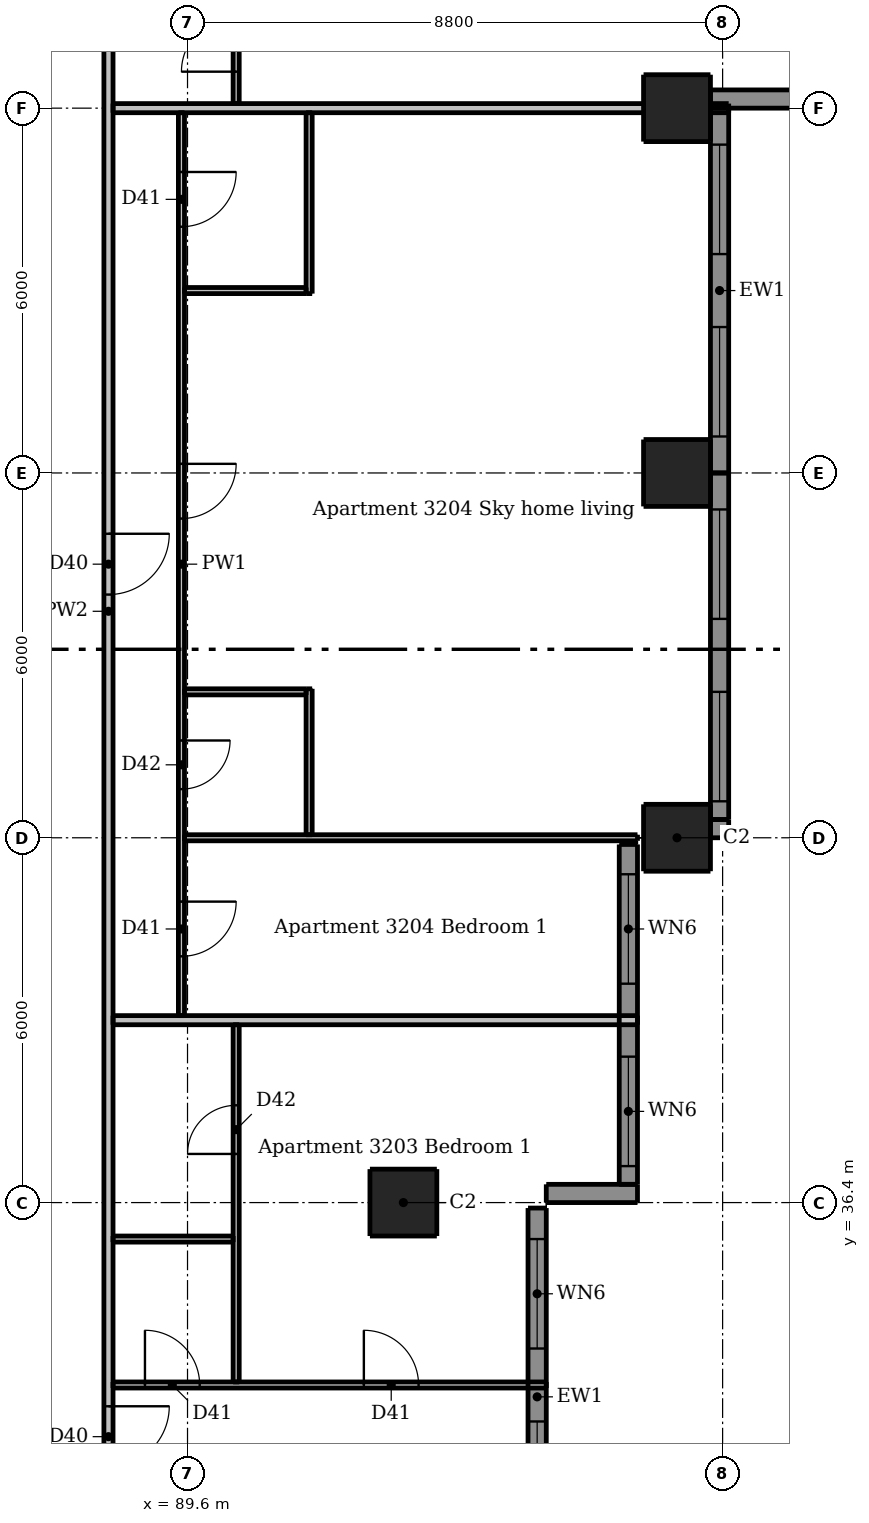
"""IFC4 building model, lengths in metres.
Left out: names, types, materials, properties, quantities, classifications, styles, units other than length and angle.
Written with IfcOpenShell. Run it as: python <this file> out.ifc"""

import sys

from ifc_helpers import new_model, si_unit, direction, frame, frame_2d, origin, origin_2d, place, context, subcontext, project, spatial, rectangle, extrude, element, fill, save


model = new_model("IFC4")
c1 = context("Model", 3, precision=1e-05, world=origin(), true_north=direction((0.0, 1.0)))
c2 = subcontext(c1, "Body", "Model", "MODEL_VIEW")
j1 = project(units=[si_unit("LENGTHUNIT", "METRE"), si_unit("PLANEANGLEUNIT", "RADIAN")], contexts=[c1])
p1 = place(None, origin())
s1 = spatial("IfcSite", under=j1, at=p1, CompositionType="ELEMENT")
p2 = place(p1, origin())
s2 = spatial("IfcBuilding", under=s1, at=p2, CompositionType="ELEMENT")
p3 = place(p2, frame((0.0, 0.0, 118.3)))
s3 = spatial("IfcBuildingStorey", under=s2, at=p3, CompositionType="ELEMENT", Elevation=118.3)
for number, where, z_axis, x_axis in (
    (1, (93.15, 36.4, 0.0), (0.0, 0.0, 1.0), (1.0, 0.0, 0.0)),
    (2, (97.65, 42.4, 0.0), (0.0, 0.0, 1.0), (1.0, 0.0, 0.0)),
    (3, (97.65, 48.4, 0.0), (0.0, 0.0, 1.0), (1.0, 0.0, 0.0)),
    (4, (97.65, 54.4, 0.0), (0.0, 0.0, 1.0), (1.0, 0.0, 0.0)),
):
    element("IfcColumn", number, at=place(p3, frame(where, z_axis=z_axis, x_axis=x_axis)), inside=s3, PredefinedType="COLUMN", context=c2, shape_type="SweptSolid", body=[
        extrude(rectangle(XDim=1.1, YDim=1.1, at=origin_2d()), origin(), (0.0, 0.0, 1.0), 3.05),
    ])
p4 = place(p3, frame((95.5, 36.55, 0.0), z_axis=(0.0, 0.0, 1.0), x_axis=(1.0, 0.0, 0.0)))
e5 = element("IfcWall", 5, at=p4, inside=s3, PredefinedType="SOLIDWALL", context=c2, shape_type="SweptSolid", body=[
    extrude(rectangle(XDim=1.5, YDim=0.3, at=frame_2d((0.75, 0.0))), origin(), (0.0, 0.0, 1.0), 3.05),
])
p5 = place(p3, frame((98.2, 42.55, 0.0), z_axis=(0.0, 0.0, 1.0), x_axis=(1.0, 0.0, 0.0)))
e6 = element("IfcWall", 6, at=p5, inside=s3, PredefinedType="SOLIDWALL", context=c2, shape_type="SweptSolid", body=[
    extrude(rectangle(XDim=0.3, YDim=0.3, at=frame_2d((0.15, 0.0))), origin(), (0.0, 0.0, 1.0), 3.05),
])
p6 = place(p3, frame((98.2, 54.55, 0.0), z_axis=(0.0, 0.0, 1.0), x_axis=(1.0, 0.0, 0.0)))
e7 = element("IfcWall", 7, at=p6, inside=s3, PredefinedType="SOLIDWALL", context=c2, shape_type="SweptSolid", body=[
    extrude(rectangle(XDim=1.8, YDim=0.3, at=frame_2d((0.9, 0.0))), origin(), (0.0, 0.0, 1.0), 3.05),
])
p7 = place(p3, frame((95.35, 30.1, 0.0), z_axis=(0.0, 0.0, 1.0), x_axis=(0.0, 1.0, 0.0)))
e8 = element("IfcWall", 8, at=p7, inside=s3, PredefinedType="SOLIDWALL", context=c2, shape_type="SweptSolid", body=[
    extrude(rectangle(XDim=6.21, YDim=0.3, at=frame_2d((3.105, 0.0))), origin(), (0.0, 0.0, 1.0), 3.05),
])
p8 = place(p7, frame((0.9, 0.0, 0.15)))
e9 = element("IfcOpeningElement", 9, at=p8, cuts=e8, PredefinedType="OPENING", context=c2, shape_type="SweptSolid", body=[
    extrude(rectangle(XDim=1.8, YDim=2.1, at=frame_2d((0.9, 1.05))), frame((0.0, 0.16, 0.0), z_axis=(0.0, -1.0, 0.0), x_axis=(1.0, 0.0, 0.0)), (0.0, 0.0, 1.0), 0.32),
])
p9 = place(p7, frame((3.9, 0.0, 0.15)))
e10 = element("IfcOpeningElement", 10, at=p9, cuts=e8, PredefinedType="OPENING", context=c2, shape_type="SweptSolid", body=[
    extrude(rectangle(XDim=1.8, YDim=2.1, at=frame_2d((0.9, 1.05))), frame((0.0, 0.16, 0.0), z_axis=(0.0, -1.0, 0.0), x_axis=(1.0, 0.0, 0.0)), (0.0, 0.0, 1.0), 0.32),
])
p10 = place(p3, frame((96.85, 36.7, 0.0), z_axis=(0.0, 0.0, 1.0), x_axis=(0.0, 1.0, 0.0)))
e11 = element("IfcWall", 11, at=p10, inside=s3, PredefinedType="SOLIDWALL", context=c2, shape_type="SweptSolid", body=[
    extrude(rectangle(XDim=5.59, YDim=0.3, at=frame_2d((2.795, 0.0))), origin(), (0.0, 0.0, 1.0), 3.05),
])
p11 = place(p10, frame((0.3, 0.0, 0.15)))
e12 = element("IfcOpeningElement", 12, at=p11, cuts=e11, PredefinedType="OPENING", context=c2, shape_type="SweptSolid", body=[
    extrude(rectangle(XDim=1.8, YDim=2.1, at=frame_2d((0.9, 1.05))), frame((0.0, 0.16, 0.0), z_axis=(0.0, -1.0, 0.0), x_axis=(1.0, 0.0, 0.0)), (0.0, 0.0, 1.0), 0.32),
])
p12 = place(p10, frame((3.3, 0.0, 0.15)))
e13 = element("IfcOpeningElement", 13, at=p12, cuts=e11, PredefinedType="OPENING", context=c2, shape_type="SweptSolid", body=[
    extrude(rectangle(XDim=1.8, YDim=2.1, at=frame_2d((0.9, 1.05))), frame((0.0, 0.16, 0.0), z_axis=(0.0, -1.0, 0.0), x_axis=(1.0, 0.0, 0.0)), (0.0, 0.0, 1.0), 0.32),
])
p13 = place(p3, frame((98.35, 42.7, 0.0), z_axis=(0.0, 0.0, 1.0), x_axis=(0.0, 1.0, 0.0)))
e14 = element("IfcWall", 14, at=p13, inside=s3, PredefinedType="SOLIDWALL", context=c2, shape_type="SweptSolid", body=[
    extrude(rectangle(XDim=5.7, YDim=0.3, at=frame_2d((2.85, 0.0))), origin(), (0.0, 0.0, 1.0), 3.05),
])
p14 = place(p13, frame((0.3, 0.0, 0.15)))
e15 = element("IfcOpeningElement", 15, at=p14, cuts=e14, PredefinedType="OPENING", context=c2, shape_type="SweptSolid", body=[
    extrude(rectangle(XDim=1.8, YDim=2.1, at=frame_2d((0.9, 1.05))), frame((0.0, 0.16, 0.0), z_axis=(0.0, -1.0, 0.0), x_axis=(1.0, 0.0, 0.0)), (0.0, 0.0, 1.0), 0.32),
])
p15 = place(p13, frame((3.3, 0.0, 0.15)))
e16 = element("IfcOpeningElement", 16, at=p15, cuts=e14, PredefinedType="OPENING", context=c2, shape_type="SweptSolid", body=[
    extrude(rectangle(XDim=1.8, YDim=2.1, at=frame_2d((0.9, 1.05))), frame((0.0, 0.16, 0.0), z_axis=(0.0, -1.0, 0.0), x_axis=(1.0, 0.0, 0.0)), (0.0, 0.0, 1.0), 0.32),
])
p16 = place(p3, frame((98.35, 48.4, 0.0), z_axis=(0.0, 0.0, 1.0), x_axis=(0.0, 1.0, 0.0)))
e17 = element("IfcWall", 17, at=p16, inside=s3, PredefinedType="SOLIDWALL", context=c2, shape_type="SweptSolid", body=[
    extrude(rectangle(XDim=6.0, YDim=0.3, at=frame_2d((3.0, 0.0))), origin(), (0.0, 0.0, 1.0), 3.05),
])
p17 = place(p16, frame((0.6, 0.0, 0.15)))
e18 = element("IfcOpeningElement", 18, at=p17, cuts=e17, PredefinedType="OPENING", context=c2, shape_type="SweptSolid", body=[
    extrude(rectangle(XDim=1.8, YDim=2.1, at=frame_2d((0.9, 1.05))), frame((0.0, 0.16, 0.0), z_axis=(0.0, -1.0, 0.0), x_axis=(1.0, 0.0, 0.0)), (0.0, 0.0, 1.0), 0.32),
])
p18 = place(p16, frame((3.6, 0.0, 0.15)))
e19 = element("IfcOpeningElement", 19, at=p18, cuts=e17, PredefinedType="OPENING", context=c2, shape_type="SweptSolid", body=[
    extrude(rectangle(XDim=1.8, YDim=2.1, at=frame_2d((0.9, 1.05))), frame((0.0, 0.16, 0.0), z_axis=(0.0, -1.0, 0.0), x_axis=(1.0, 0.0, 0.0)), (0.0, 0.0, 1.0), 0.32),
])
p19 = place(p3, frame((89.5, 54.325, 0.0), z_axis=(0.0, 0.0, 1.0), x_axis=(0.0, -1.0, 0.0)))
e20 = element("IfcWall", 20, at=p19, inside=s3, PredefinedType="PARTITIONING", context=c2, shape_type="SweptSolid", body=[
    extrude(rectangle(XDim=14.85, YDim=0.1, at=frame_2d((7.425, 0.0))), origin(), (0.0, 0.0, 1.0), 3.05),
])
p20 = place(p19, frame((5.775, 0.0, 0.0)))
e21 = element("IfcOpeningElement", 21, at=p20, cuts=e20, PredefinedType="OPENING", context=c2, shape_type="SweptSolid", body=[
    extrude(rectangle(XDim=0.9, YDim=2.1, at=frame_2d((0.45, 1.05))), frame((0.0, 0.06, 0.0), z_axis=(0.0, -1.0, 0.0), x_axis=(1.0, 0.0, 0.0)), (0.0, 0.0, 1.0), 0.12),
])
p21 = place(p19, frame((0.975, 0.0, 0.0)))
e22 = element("IfcOpeningElement", 22, at=p21, cuts=e20, PredefinedType="OPENING", context=c2, shape_type="SweptSolid", body=[
    extrude(rectangle(XDim=0.9, YDim=2.1, at=frame_2d((0.45, 1.05))), frame((0.0, 0.06, 0.0), z_axis=(0.0, -1.0, 0.0), x_axis=(1.0, 0.0, 0.0)), (0.0, 0.0, 1.0), 0.12),
])
p22 = place(p19, frame((12.975, 0.0, 0.0)))
e23 = element("IfcOpeningElement", 23, at=p22, cuts=e20, PredefinedType="OPENING", context=c2, shape_type="SweptSolid", body=[
    extrude(rectangle(XDim=0.9, YDim=2.1, at=frame_2d((0.45, 1.05))), frame((0.0, 0.06, 0.0), z_axis=(0.0, -1.0, 0.0), x_axis=(1.0, 0.0, 0.0)), (0.0, 0.0, 1.0), 0.12),
])
p23 = place(p19, frame((10.325, 0.0, 0.0)))
e24 = element("IfcOpeningElement", 24, at=p23, cuts=e20, PredefinedType="OPENING", context=c2, shape_type="SweptSolid", body=[
    extrude(rectangle(XDim=0.8, YDim=2.1, at=frame_2d((0.4, 1.05))), frame((0.0, 0.06, 0.0), z_axis=(0.0, -1.0, 0.0), x_axis=(1.0, 0.0, 0.0)), (0.0, 0.0, 1.0), 0.12),
])
p24 = place(p3, frame((90.4, 33.45, 0.0), z_axis=(0.0, 0.0, 1.0), x_axis=(0.0, 1.0, 0.0)))
e25 = element("IfcWall", 25, at=p24, inside=s3, PredefinedType="PARTITIONING", context=c2, shape_type="SweptSolid", body=[
    extrude(rectangle(XDim=5.875, YDim=0.1, at=frame_2d((2.938, 0.0))), origin(), (0.0, 0.0, 1.0), 3.05),
])
p25 = place(p24, frame((3.75, 0.0, 0.0)))
e26 = element("IfcOpeningElement", 26, at=p25, cuts=e25, PredefinedType="OPENING", context=c2, shape_type="SweptSolid", body=[
    extrude(rectangle(XDim=0.8, YDim=2.1, at=frame_2d((0.4, 1.05))), frame((0.0, 0.06, 0.0), z_axis=(0.0, -1.0, 0.0), x_axis=(1.0, 0.0, 0.0)), (0.0, 0.0, 1.0), 0.12),
])
p26 = place(p3, frame((90.4, 54.475, 0.0), z_axis=(0.0, 0.0, 1.0), x_axis=(0.0, 1.0, 0.0)))
e27 = element("IfcWall", 27, at=p26, inside=s3, PredefinedType="PARTITIONING", context=c2, shape_type="SweptSolid", body=[
    extrude(rectangle(XDim=2.075, YDim=0.1, at=frame_2d((1.038, 0.0))), origin(), (0.0, 0.0, 1.0), 3.05),
])
p27 = place(p26, frame((0.525, 0.0, 0.0)))
e28 = element("IfcOpeningElement", 28, at=p27, cuts=e27, PredefinedType="OPENING", context=c2, shape_type="SweptSolid", body=[
    extrude(rectangle(XDim=0.9, YDim=2.1, at=frame_2d((0.45, 1.05))), frame((0.0, 0.06, 0.0), z_axis=(0.0, -1.0, 0.0), x_axis=(1.0, 0.0, 0.0)), (0.0, 0.0, 1.0), 0.12),
])
p28 = place(p3, frame((91.6, 42.45, 0.0), z_axis=(0.0, 0.0, 1.0), x_axis=(0.0, 1.0, 0.0)))
e29 = element("IfcWall", 29, at=p28, inside=s3, PredefinedType="PARTITIONING", context=c2, shape_type="SweptSolid", body=[
    extrude(rectangle(XDim=2.4, YDim=0.1, at=frame_2d((1.2, 0.0))), origin(), (0.0, 0.0, 1.0), 3.05),
])
p29 = place(p3, frame((91.6, 51.35, 0.0), z_axis=(0.0, 0.0, 1.0), x_axis=(0.0, 1.0, 0.0)))
e30 = element("IfcWall", 30, at=p29, inside=s3, PredefinedType="PARTITIONING", context=c2, shape_type="SweptSolid", body=[
    extrude(rectangle(XDim=2.975, YDim=0.1, at=frame_2d((1.487, 0.0))), origin(), (0.0, 0.0, 1.0), 3.05),
])
for number, where, z_axis, x_axis in (
    (31, (89.55, 51.4, 0.0), (0.0, 0.0, 1.0), (1.0, 0.0, 0.0)),
    (32, (89.55, 44.8, 0.0), (0.0, 0.0, 1.0), (1.0, 0.0, 0.0)),
):
    element("IfcWall", number, at=place(p3, frame(where, z_axis=z_axis, x_axis=x_axis)), inside=s3, PredefinedType="PARTITIONING", context=c2, shape_type="SweptSolid", body=[
        extrude(rectangle(XDim=2.0, YDim=0.1, at=frame_2d((1.0, 0.0))), origin(), (0.0, 0.0, 1.0), 3.05),
    ])
p30 = place(p3, frame((89.55, 42.4, 0.0), z_axis=(0.0, 0.0, 1.0), x_axis=(1.0, 0.0, 0.0)))
e33 = element("IfcWall", 33, at=p30, inside=s3, PredefinedType="PARTITIONING", context=c2, shape_type="SweptSolid", body=[
    extrude(rectangle(XDim=7.45, YDim=0.1, at=frame_2d((3.725, 0.0))), origin(), (0.0, 0.0, 1.0), 2.516),
])
p31 = place(p3, frame((88.375, 35.8, 0.0), z_axis=(0.0, 0.0, 1.0), x_axis=(1.0, 0.0, 0.0)))
e34 = element("IfcWall", 34, at=p31, inside=s3, PredefinedType="PARTITIONING", context=c2, shape_type="SweptSolid", body=[
    extrude(rectangle(XDim=1.975, YDim=0.1, at=frame_2d((0.988, 0.0))), origin(), (0.0, 0.0, 1.0), 3.05),
])
p32 = place(p3, frame((88.375, 33.4, 0.0), z_axis=(0.0, 0.0, 1.0), x_axis=(1.0, 0.0, 0.0)))
e35 = element("IfcWall", 35, at=p32, inside=s3, PredefinedType="PARTITIONING", context=c2, shape_type="SweptSolid", body=[
    extrude(rectangle(XDim=7.125, YDim=0.1, at=frame_2d((3.562, 0.0))), origin(), (0.0, 0.0, 1.0), 3.05),
])
p33 = place(p32, frame((0.525, 0.0, 0.0)))
e36 = element("IfcOpeningElement", 36, at=p33, cuts=e35, PredefinedType="OPENING", context=c2, shape_type="SweptSolid", body=[
    extrude(rectangle(XDim=0.9, YDim=2.1, at=frame_2d((0.45, 1.05))), frame((0.0, 0.06, 0.0), z_axis=(0.0, -1.0, 0.0), x_axis=(1.0, 0.0, 0.0)), (0.0, 0.0, 1.0), 0.12),
])
p34 = place(p32, frame((4.125, 0.0, 0.0)))
e37 = element("IfcOpeningElement", 37, at=p34, cuts=e35, PredefinedType="OPENING", context=c2, shape_type="SweptSolid", body=[
    extrude(rectangle(XDim=0.9, YDim=2.1, at=frame_2d((0.45, 1.05))), frame((0.0, 0.06, 0.0), z_axis=(0.0, -1.0, 0.0), x_axis=(1.0, 0.0, 0.0)), (0.0, 0.0, 1.0), 0.12),
])
p35 = place(p3, frame((88.3, 60.475, 0.0), z_axis=(0.0, 0.0, 1.0), x_axis=(0.0, -1.0, 0.0)))
e38 = element("IfcWall", 38, at=p35, inside=s3, PredefinedType="PARTITIONING", context=c2, shape_type="SweptSolid", body=[
    extrude(rectangle(XDim=28.7, YDim=0.15, at=frame_2d((14.35, 0.0))), origin(), (0.0, 0.0, 1.0), 3.05),
])
p36 = place(p35, frame((27.425, 0.0, 0.0)))
e39 = element("IfcOpeningElement", 39, at=p36, cuts=e38, PredefinedType="OPENING", context=c2, shape_type="SweptSolid", body=[
    extrude(rectangle(XDim=1.0, YDim=2.1, at=frame_2d((0.5, 1.05))), frame((0.0, 0.085, 0.0), z_axis=(0.0, -1.0, 0.0), x_axis=(1.0, 0.0, 0.0)), (0.0, 0.0, 1.0), 0.17),
])
p37 = place(p35, frame((13.075, 0.0, 0.0)))
e40 = element("IfcOpeningElement", 40, at=p37, cuts=e38, PredefinedType="OPENING", context=c2, shape_type="SweptSolid", body=[
    extrude(rectangle(XDim=1.0, YDim=2.1, at=frame_2d((0.5, 1.05))), frame((0.0, 0.085, 0.0), z_axis=(0.0, -1.0, 0.0), x_axis=(1.0, 0.0, 0.0)), (0.0, 0.0, 1.0), 0.17),
])
p38 = place(p35, frame((2.575, 0.0, 0.0)))
e41 = element("IfcOpeningElement", 41, at=p38, cuts=e38, PredefinedType="OPENING", context=c2, shape_type="SweptSolid", body=[
    extrude(rectangle(XDim=1.0, YDim=2.1, at=frame_2d((0.5, 1.05))), frame((0.0, 0.085, 0.0), z_axis=(0.0, -1.0, 0.0), x_axis=(1.0, 0.0, 0.0)), (0.0, 0.0, 1.0), 0.17),
])
p39 = place(p3, frame((88.375, 54.4, 0.0), z_axis=(0.0, 0.0, 1.0), x_axis=(1.0, 0.0, 0.0)))
e42 = element("IfcWall", 42, at=p39, inside=s3, PredefinedType="PARTITIONING", context=c2, shape_type="SweptSolid", body=[
    extrude(rectangle(XDim=10.125, YDim=0.15, at=frame_2d((5.062, 0.0))), origin(), (0.0, 0.0, 1.0), 2.516),
])
p40 = place(p3, frame((88.375, 39.4, 0.0), z_axis=(0.0, 0.0, 1.0), x_axis=(1.0, 0.0, 0.0)))
e43 = element("IfcWall", 43, at=p40, inside=s3, PredefinedType="PARTITIONING", context=c2, shape_type="SweptSolid", body=[
    extrude(rectangle(XDim=8.625, YDim=0.15, at=frame_2d((4.312, 0.0))), origin(), (0.0, 0.0, 1.0), 3.05),
])
p41 = place(p8, origin())
e44 = element("IfcWindow", 44, at=p41, inside=s3, PartitioningType="DOUBLE_PANEL_VERTICAL", PredefinedType="WINDOW", context=c2, shape_type="SweptSolid", body=[
    extrude(rectangle(XDim=1.8, YDim=2.1, at=frame_2d((0.9, 1.05))), frame((0.0, 0.03, 0.0), z_axis=(0.0, -1.0, 0.0), x_axis=(1.0, 0.0, 0.0)), (0.0, 0.0, 1.0), 0.06),
])
fill(e9, e44)
p42 = place(p9, origin())
e45 = element("IfcWindow", 45, at=p42, inside=s3, PartitioningType="DOUBLE_PANEL_VERTICAL", PredefinedType="WINDOW", context=c2, shape_type="SweptSolid", body=[
    extrude(rectangle(XDim=1.8, YDim=2.1, at=frame_2d((0.9, 1.05))), frame((0.0, 0.03, 0.0), z_axis=(0.0, -1.0, 0.0), x_axis=(1.0, 0.0, 0.0)), (0.0, 0.0, 1.0), 0.06),
])
fill(e10, e45)
p43 = place(p11, origin())
e46 = element("IfcWindow", 46, at=p43, inside=s3, PartitioningType="DOUBLE_PANEL_VERTICAL", PredefinedType="WINDOW", context=c2, shape_type="SweptSolid", body=[
    extrude(rectangle(XDim=1.8, YDim=2.1, at=frame_2d((0.9, 1.05))), frame((0.0, 0.03, 0.0), z_axis=(0.0, -1.0, 0.0), x_axis=(1.0, 0.0, 0.0)), (0.0, 0.0, 1.0), 0.06),
])
fill(e12, e46)
p44 = place(p12, origin())
e47 = element("IfcWindow", 47, at=p44, inside=s3, PartitioningType="DOUBLE_PANEL_VERTICAL", PredefinedType="WINDOW", context=c2, shape_type="SweptSolid", body=[
    extrude(rectangle(XDim=1.8, YDim=2.1, at=frame_2d((0.9, 1.05))), frame((0.0, 0.03, 0.0), z_axis=(0.0, -1.0, 0.0), x_axis=(1.0, 0.0, 0.0)), (0.0, 0.0, 1.0), 0.06),
])
fill(e13, e47)
p45 = place(p14, origin())
e48 = element("IfcWindow", 48, at=p45, inside=s3, PartitioningType="DOUBLE_PANEL_VERTICAL", PredefinedType="WINDOW", context=c2, shape_type="SweptSolid", body=[
    extrude(rectangle(XDim=1.8, YDim=2.1, at=frame_2d((0.9, 1.05))), frame((0.0, 0.03, 0.0), z_axis=(0.0, -1.0, 0.0), x_axis=(1.0, 0.0, 0.0)), (0.0, 0.0, 1.0), 0.06),
])
fill(e15, e48)
p46 = place(p15, origin())
e49 = element("IfcWindow", 49, at=p46, inside=s3, PartitioningType="DOUBLE_PANEL_VERTICAL", PredefinedType="WINDOW", context=c2, shape_type="SweptSolid", body=[
    extrude(rectangle(XDim=1.8, YDim=2.1, at=frame_2d((0.9, 1.05))), frame((0.0, 0.03, 0.0), z_axis=(0.0, -1.0, 0.0), x_axis=(1.0, 0.0, 0.0)), (0.0, 0.0, 1.0), 0.06),
])
fill(e16, e49)
p47 = place(p17, origin())
e50 = element("IfcWindow", 50, at=p47, inside=s3, PartitioningType="DOUBLE_PANEL_VERTICAL", PredefinedType="WINDOW", context=c2, shape_type="SweptSolid", body=[
    extrude(rectangle(XDim=1.8, YDim=2.1, at=frame_2d((0.9, 1.05))), frame((0.0, 0.03, 0.0), z_axis=(0.0, -1.0, 0.0), x_axis=(1.0, 0.0, 0.0)), (0.0, 0.0, 1.0), 0.06),
])
fill(e18, e50)
p48 = place(p18, origin())
e51 = element("IfcWindow", 51, at=p48, inside=s3, PartitioningType="DOUBLE_PANEL_VERTICAL", PredefinedType="WINDOW", context=c2, shape_type="SweptSolid", body=[
    extrude(rectangle(XDim=1.8, YDim=2.1, at=frame_2d((0.9, 1.05))), frame((0.0, 0.03, 0.0), z_axis=(0.0, -1.0, 0.0), x_axis=(1.0, 0.0, 0.0)), (0.0, 0.0, 1.0), 0.06),
])
fill(e19, e51)
p49 = place(p36, origin())
e52 = element("IfcDoor", 52, at=p49, inside=s3, OperationType="SINGLE_SWING_LEFT", PredefinedType="DOOR", context=c2, shape_type="SweptSolid", body=[
    extrude(rectangle(XDim=1.0, YDim=2.1, at=frame_2d((0.5, 1.05))), frame((0.0, 0.025, 0.0), z_axis=(0.0, -1.0, 0.0), x_axis=(1.0, 0.0, 0.0)), (0.0, 0.0, 1.0), 0.05),
])
fill(e39, e52)
p50 = place(p33, origin())
e53 = element("IfcDoor", 53, at=p50, inside=s3, OperationType="SINGLE_SWING_LEFT", PredefinedType="DOOR", context=c2, shape_type="SweptSolid", body=[
    extrude(rectangle(XDim=0.9, YDim=2.1, at=frame_2d((0.45, 1.05))), frame((0.0, 0.025, 0.0), z_axis=(0.0, -1.0, 0.0), x_axis=(1.0, 0.0, 0.0)), (0.0, 0.0, 1.0), 0.05),
])
fill(e36, e53)
p51 = place(p34, origin())
e54 = element("IfcDoor", 54, at=p51, inside=s3, OperationType="SINGLE_SWING_LEFT", PredefinedType="DOOR", context=c2, shape_type="SweptSolid", body=[
    extrude(rectangle(XDim=0.9, YDim=2.1, at=frame_2d((0.45, 1.05))), frame((0.0, 0.025, 0.0), z_axis=(0.0, -1.0, 0.0), x_axis=(1.0, 0.0, 0.0)), (0.0, 0.0, 1.0), 0.05),
])
fill(e37, e54)
p52 = place(p25, origin())
e55 = element("IfcDoor", 55, at=p52, inside=s3, OperationType="SINGLE_SWING_LEFT", PredefinedType="DOOR", context=c2, shape_type="SweptSolid", body=[
    extrude(rectangle(XDim=0.8, YDim=2.1, at=frame_2d((0.4, 1.05))), frame((0.0, 0.025, 0.0), z_axis=(0.0, -1.0, 0.0), x_axis=(1.0, 0.0, 0.0)), (0.0, 0.0, 1.0), 0.05),
])
fill(e26, e55)
p53 = place(p37, origin())
e56 = element("IfcDoor", 56, at=p53, inside=s3, OperationType="SINGLE_SWING_LEFT", PredefinedType="DOOR", context=c2, shape_type="SweptSolid", body=[
    extrude(rectangle(XDim=1.0, YDim=2.1, at=frame_2d((0.5, 1.05))), frame((0.0, 0.025, 0.0), z_axis=(0.0, -1.0, 0.0), x_axis=(1.0, 0.0, 0.0)), (0.0, 0.0, 1.0), 0.05),
])
fill(e40, e56)
p54 = place(p20, origin())
e57 = element("IfcDoor", 57, at=p54, inside=s3, OperationType="SINGLE_SWING_LEFT", PredefinedType="DOOR", context=c2, shape_type="SweptSolid", body=[
    extrude(rectangle(XDim=0.9, YDim=2.1, at=frame_2d((0.45, 1.05))), frame((0.0, 0.025, 0.0), z_axis=(0.0, -1.0, 0.0), x_axis=(1.0, 0.0, 0.0)), (0.0, 0.0, 1.0), 0.05),
])
fill(e21, e57)
p55 = place(p21, origin())
e58 = element("IfcDoor", 58, at=p55, inside=s3, OperationType="SINGLE_SWING_LEFT", PredefinedType="DOOR", context=c2, shape_type="SweptSolid", body=[
    extrude(rectangle(XDim=0.9, YDim=2.1, at=frame_2d((0.45, 1.05))), frame((0.0, 0.025, 0.0), z_axis=(0.0, -1.0, 0.0), x_axis=(1.0, 0.0, 0.0)), (0.0, 0.0, 1.0), 0.05),
])
fill(e22, e58)
p56 = place(p22, origin())
e59 = element("IfcDoor", 59, at=p56, inside=s3, OperationType="SINGLE_SWING_LEFT", PredefinedType="DOOR", context=c2, shape_type="SweptSolid", body=[
    extrude(rectangle(XDim=0.9, YDim=2.1, at=frame_2d((0.45, 1.05))), frame((0.0, 0.025, 0.0), z_axis=(0.0, -1.0, 0.0), x_axis=(1.0, 0.0, 0.0)), (0.0, 0.0, 1.0), 0.05),
])
fill(e23, e59)
p57 = place(p23, origin())
e60 = element("IfcDoor", 60, at=p57, inside=s3, OperationType="SINGLE_SWING_LEFT", PredefinedType="DOOR", context=c2, shape_type="SweptSolid", body=[
    extrude(rectangle(XDim=0.8, YDim=2.1, at=frame_2d((0.4, 1.05))), frame((0.0, 0.025, 0.0), z_axis=(0.0, -1.0, 0.0), x_axis=(1.0, 0.0, 0.0)), (0.0, 0.0, 1.0), 0.05),
])
fill(e24, e60)
p58 = place(p27, origin())
e61 = element("IfcDoor", 61, at=p58, inside=s3, OperationType="SINGLE_SWING_LEFT", PredefinedType="DOOR", context=c2, shape_type="SweptSolid", body=[
    extrude(rectangle(XDim=0.9, YDim=2.1, at=frame_2d((0.45, 1.05))), frame((0.0, 0.025, 0.0), z_axis=(0.0, -1.0, 0.0), x_axis=(1.0, 0.0, 0.0)), (0.0, 0.0, 1.0), 0.05),
])
fill(e28, e61)
save(model, sys.argv[1])
